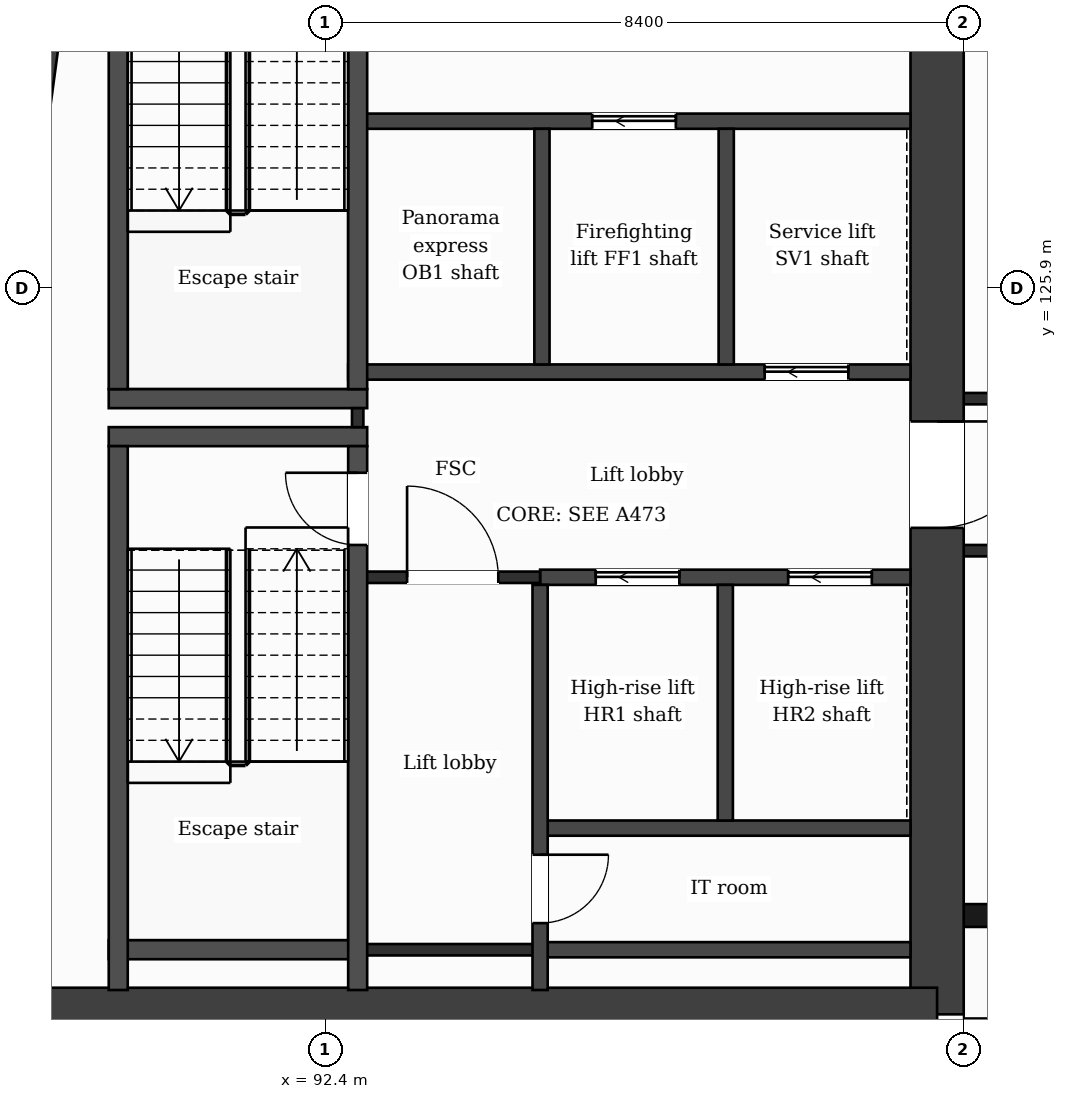
"""IFC4 building model, lengths in metres.
Left out: names, types, materials, properties, quantities, classifications, styles, units other than length and angle.
Written with IfcOpenShell. Run it as: python <this file> out.ifc"""

import sys

from ifc_helpers import new_model, si_unit, direction, frame, frame_2d, origin, place, context, subcontext, project, spatial, rectangle, extrude, element, fill, save


model = new_model("IFC4")
c1 = context("Model", 3, precision=1e-05, world=origin(), true_north=direction((0.0, 1.0)))
c2 = subcontext(c1, "Body", "Model", "MODEL_VIEW")
j1 = project(units=[si_unit("LENGTHUNIT", "METRE"), si_unit("PLANEANGLEUNIT", "RADIAN")], contexts=[c1])
p1 = place(None, origin())
s1 = spatial("IfcSite", under=j1, at=p1, CompositionType="ELEMENT")
p2 = place(p1, origin())
s2 = spatial("IfcBuilding", under=s1, at=p2, CompositionType="ELEMENT")
p3 = place(p2, frame((0.0, 0.0, 296.0)))
s3 = spatial("IfcBuildingStorey", under=s2, at=p3, CompositionType="ELEMENT", Elevation=296.0)
p4 = place(p3, frame((100.45, 132.05, 0.0), z_axis=(0.0, 0.0, 1.0), x_axis=(0.0, -1.0, 0.0)))
e1 = element("IfcWall", 1, at=p4, inside=s3, PredefinedType="SHEAR", context=c2, shape_type="SweptSolid", body=[
    extrude(rectangle(XDim=15.7, YDim=0.7, at=frame_2d((7.85, 0.0))), origin(), (0.0, 0.0, 1.0), 3.7),
])
p5 = place(p4, frame((7.9, 0.0, 0.0)))
e2 = element("IfcOpeningElement", 2, at=p5, cuts=e1, PredefinedType="OPENING", context=c2, shape_type="SweptSolid", body=[
    extrude(rectangle(XDim=1.4, YDim=2.1, at=frame_2d((0.7, 1.05))), frame((0.0, 0.36, 0.0), z_axis=(0.0, -1.0, 0.0), x_axis=(1.0, 0.0, 0.0)), (0.0, 0.0, 1.0), 0.72),
])
p6 = place(p3, frame((100.45, 116.35, 0.0), z_axis=(0.0, 0.0, 1.0), x_axis=(-1.0, 0.0, 0.0)))
e3 = element("IfcWall", 3, at=p6, inside=s3, PredefinedType="SHEAR", context=c2, shape_type="SweptSolid", body=[
    extrude(rectangle(XDim=13.627, YDim=0.7, at=frame_2d((6.813, 0.0))), origin(), (0.0, 0.0, 1.0), 3.7),
])
p7 = place(p3, frame((86.823, 116.35, 0.0), z_axis=(0.0, 0.0, 1.0), x_axis=(0.133416378607, 0.99106007382, 0.0)))
e4 = element("IfcWall", 4, at=p7, inside=s3, PredefinedType="SHEAR", context=c2, shape_type="SweptSolid", body=[
    extrude(rectangle(XDim=15.842, YDim=0.7, at=frame_2d((7.921, 0.0))), origin(), (0.0, 0.0, 1.0), 3.7),
])
p8 = place(p3, frame((100.8, 117.65, 0.0), z_axis=(0.0, 0.0, 1.0), x_axis=(1.0, 0.0, 0.0)))
e5 = element("IfcWall", 5, at=p8, inside=s3, PredefinedType="SOLIDWALL", context=c2, shape_type="SweptSolid", body=[
    extrude(rectangle(XDim=25.2, YDim=0.3, at=frame_2d((12.6, 0.0))), origin(), (0.0, 0.0, 1.0), 3.38),
])
p9 = place(p8, frame((1.55, 0.0, 0.9)))
e6 = element("IfcOpeningElement", 6, at=p9, cuts=e5, PredefinedType="OPENING", context=c2, shape_type="SweptSolid", body=[
    extrude(rectangle(XDim=1.2, YDim=2.1, at=frame_2d((0.6, 1.05))), frame((0.0, 0.16, 0.0), z_axis=(0.0, -1.0, 0.0), x_axis=(1.0, 0.0, 0.0)), (0.0, 0.0, 1.0), 0.32),
])
p10 = place(p8, frame((5.7, 0.0, 0.9)))
e7 = element("IfcOpeningElement", 7, at=p10, cuts=e5, PredefinedType="OPENING", context=c2, shape_type="SweptSolid", body=[
    extrude(rectangle(XDim=1.2, YDim=2.1, at=frame_2d((0.6, 1.05))), frame((0.0, 0.16, 0.0), z_axis=(0.0, -1.0, 0.0), x_axis=(1.0, 0.0, 0.0)), (0.0, 0.0, 1.0), 0.32),
])
p11 = place(p8, frame((9.0, 0.0, 0.0)))
e8 = element("IfcOpeningElement", 8, at=p11, cuts=e5, PredefinedType="OPENING", context=c2, shape_type="SweptSolid", body=[
    extrude(rectangle(XDim=1.2, YDim=2.4, at=frame_2d((0.6, 1.2))), frame((0.0, 0.16, 0.0), z_axis=(0.0, -1.0, 0.0), x_axis=(1.0, 0.0, 0.0)), (0.0, 0.0, 1.0), 0.32),
])
p12 = place(p8, frame((10.8, 0.0, 0.9)))
e9 = element("IfcOpeningElement", 9, at=p12, cuts=e5, PredefinedType="OPENING", context=c2, shape_type="SweptSolid", body=[
    extrude(rectangle(XDim=1.2, YDim=2.1, at=frame_2d((0.6, 1.05))), frame((0.0, 0.16, 0.0), z_axis=(0.0, -1.0, 0.0), x_axis=(1.0, 0.0, 0.0)), (0.0, 0.0, 1.0), 0.32),
])
p13 = place(p8, frame((13.5, 0.0, 0.9)))
e10 = element("IfcOpeningElement", 10, at=p13, cuts=e5, PredefinedType="OPENING", context=c2, shape_type="SweptSolid", body=[
    extrude(rectangle(XDim=2.4, YDim=2.1, at=frame_2d((1.2, 1.05))), frame((0.0, 0.16, 0.0), z_axis=(0.0, -1.0, 0.0), x_axis=(1.0, 0.0, 0.0)), (0.0, 0.0, 1.0), 0.32),
])
p14 = place(p8, frame((17.4, 0.0, 0.0)))
e11 = element("IfcOpeningElement", 11, at=p14, cuts=e5, PredefinedType="OPENING", context=c2, shape_type="SweptSolid", body=[
    extrude(rectangle(XDim=1.2, YDim=2.4, at=frame_2d((0.6, 1.2))), frame((0.0, 0.16, 0.0), z_axis=(0.0, -1.0, 0.0), x_axis=(1.0, 0.0, 0.0)), (0.0, 0.0, 1.0), 0.32),
])
p15 = place(p8, frame((19.2, 0.0, 0.9)))
e12 = element("IfcOpeningElement", 12, at=p15, cuts=e5, PredefinedType="OPENING", context=c2, shape_type="SweptSolid", body=[
    extrude(rectangle(XDim=1.2, YDim=2.1, at=frame_2d((0.6, 1.05))), frame((0.0, 0.16, 0.0), z_axis=(0.0, -1.0, 0.0), x_axis=(1.0, 0.0, 0.0)), (0.0, 0.0, 1.0), 0.32),
])
p16 = place(p8, frame((21.85, 0.0, 0.9)))
e13 = element("IfcOpeningElement", 13, at=p16, cuts=e5, PredefinedType="OPENING", context=c2, shape_type="SweptSolid", body=[
    extrude(rectangle(XDim=2.4, YDim=2.1, at=frame_2d((1.2, 1.05))), frame((0.0, 0.16, 0.0), z_axis=(0.0, -1.0, 0.0), x_axis=(1.0, 0.0, 0.0)), (0.0, 0.0, 1.0), 0.32),
])
p17 = place(p3, frame((95.227, 117.2, 0.0), z_axis=(0.0, 0.0, 1.0), x_axis=(1.0, 0.0, 0.0)))
e14 = element("IfcWall", 14, at=p17, inside=s3, PredefinedType="PARTITIONING", context=c2, shape_type="SweptSolid", body=[
    extrude(rectangle(XDim=4.873, YDim=0.2, at=frame_2d((2.437, 0.0))), origin(), (0.0, 0.0, 1.0), 3.38),
])
p18 = place(p3, frame((92.827, 117.2, 0.0), z_axis=(0.0, 0.0, 1.0), x_axis=(1.0, 0.0, 0.0)))
e15 = element("IfcWall", 15, at=p18, inside=s3, PredefinedType="PARTITIONING", context=c2, shape_type="SweptSolid", body=[
    extrude(rectangle(XDim=2.4, YDim=0.15, at=frame_2d((1.2, 0.0))), origin(), (0.0, 0.0, 1.0), 3.38),
])
p19 = place(p3, frame((89.552, 117.2, 0.0), z_axis=(0.0, 0.0, 1.0), x_axis=(1.0, 0.0, 0.0)))
e16 = element("IfcWall", 16, at=p19, inside=s3, PredefinedType="PARTITIONING", context=c2, shape_type="SweptSolid", body=[
    extrude(rectangle(XDim=3.275, YDim=0.25, at=frame_2d((1.637, 0.0))), origin(), (0.0, 0.0, 1.0), 3.38),
])
p20 = place(p3, frame((95.227, 118.8, 0.0), z_axis=(0.0, 0.0, 1.0), x_axis=(1.0, 0.0, 0.0)))
e17 = element("IfcWall", 17, at=p20, inside=s3, PredefinedType="PARTITIONING", context=c2, shape_type="SweptSolid", body=[
    extrude(rectangle(XDim=4.873, YDim=0.2, at=frame_2d((2.437, 0.0))), origin(), (0.0, 0.0, 1.0), 3.38),
])
p21 = place(p3, frame((95.227, 122.1, 0.0), z_axis=(0.0, 0.0, 1.0), x_axis=(1.0, 0.0, 0.0)))
e18 = element("IfcWall", 18, at=p21, inside=s3, PredefinedType="PARTITIONING", context=c2, shape_type="SweptSolid", body=[
    extrude(rectangle(XDim=4.873, YDim=0.2, at=frame_2d((2.437, 0.0))), origin(), (0.0, 0.0, 1.0), 3.38),
])
p22 = place(p21, frame((0.732, 0.0, 0.0)))
e19 = element("IfcOpeningElement", 19, at=p22, cuts=e18, PredefinedType="OPENING", context=c2, shape_type="SweptSolid", body=[
    extrude(rectangle(XDim=1.1, YDim=2.1, at=frame_2d((0.55, 1.05))), frame((0.0, 0.11, 0.0), z_axis=(0.0, -1.0, 0.0), x_axis=(1.0, 0.0, 0.0)), (0.0, 0.0, 1.0), 0.22),
])
p23 = place(p21, frame((3.264, 0.0, 0.0)))
e20 = element("IfcOpeningElement", 20, at=p23, cuts=e18, PredefinedType="OPENING", context=c2, shape_type="SweptSolid", body=[
    extrude(rectangle(XDim=1.1, YDim=2.1, at=frame_2d((0.55, 1.05))), frame((0.0, 0.11, 0.0), z_axis=(0.0, -1.0, 0.0), x_axis=(1.0, 0.0, 0.0)), (0.0, 0.0, 1.0), 0.22),
])
p24 = place(p3, frame((92.827, 122.1, 0.0), z_axis=(0.0, 0.0, 1.0), x_axis=(1.0, 0.0, 0.0)))
e21 = element("IfcWall", 21, at=p24, inside=s3, PredefinedType="PARTITIONING", context=c2, shape_type="SweptSolid", body=[
    extrude(rectangle(XDim=2.4, YDim=0.15, at=frame_2d((1.2, 0.0))), origin(), (0.0, 0.0, 1.0), 3.38),
])
p25 = place(p24, frame((0.65, 0.0, 0.0)))
e22 = element("IfcOpeningElement", 22, at=p25, cuts=e21, PredefinedType="OPENING", context=c2, shape_type="SweptSolid", body=[
    extrude(rectangle(XDim=1.2, YDim=2.1, at=frame_2d((0.6, 1.05))), frame((0.0, 0.085, 0.0), z_axis=(0.0, -1.0, 0.0), x_axis=(1.0, 0.0, 0.0)), (0.0, 0.0, 1.0), 0.17),
])
p26 = place(p3, frame((100.8, 122.45, 0.0), z_axis=(0.0, 0.0, 1.0), x_axis=(1.0, 0.0, 0.0)))
e23 = element("IfcWall", 23, at=p26, inside=s3, PredefinedType="PARTITIONING", context=c2, shape_type="SweptSolid", body=[
    extrude(rectangle(XDim=25.2, YDim=0.15, at=frame_2d((12.6, 0.0))), origin(), (0.0, 0.0, 1.0), 3.38),
])
p27 = place(p26, frame((1.6, 0.0, 0.0)))
e24 = element("IfcOpeningElement", 24, at=p27, cuts=e23, PredefinedType="OPENING", context=c2, shape_type="SweptSolid", body=[
    extrude(rectangle(XDim=1.0, YDim=2.1, at=frame_2d((0.5, 1.05))), frame((0.0, 0.085, 0.0), z_axis=(0.0, -1.0, 0.0), x_axis=(1.0, 0.0, 0.0)), (0.0, 0.0, 1.0), 0.17),
])
p28 = place(p26, frame((11.12, 0.0, 0.0)))
e25 = element("IfcOpeningElement", 25, at=p28, cuts=e23, PredefinedType="OPENING", context=c2, shape_type="SweptSolid", body=[
    extrude(rectangle(XDim=0.95, YDim=2.1, at=frame_2d((0.475, 1.05))), frame((0.0, 0.085, 0.0), z_axis=(0.0, -1.0, 0.0), x_axis=(1.0, 0.0, 0.0)), (0.0, 0.0, 1.0), 0.17),
])
p29 = place(p26, frame((13.05, 0.0, 0.0)))
e26 = element("IfcOpeningElement", 26, at=p29, cuts=e23, PredefinedType="OPENING", context=c2, shape_type="SweptSolid", body=[
    extrude(rectangle(XDim=1.0, YDim=2.1, at=frame_2d((0.5, 1.05))), frame((0.0, 0.085, 0.0), z_axis=(0.0, -1.0, 0.0), x_axis=(1.0, 0.0, 0.0)), (0.0, 0.0, 1.0), 0.17),
])
p30 = place(p26, frame((19.61, 0.0, 0.0)))
e27 = element("IfcOpeningElement", 27, at=p30, cuts=e23, PredefinedType="OPENING", context=c2, shape_type="SweptSolid", body=[
    extrude(rectangle(XDim=0.95, YDim=2.1, at=frame_2d((0.475, 1.05))), frame((0.0, 0.085, 0.0), z_axis=(0.0, -1.0, 0.0), x_axis=(1.0, 0.0, 0.0)), (0.0, 0.0, 1.0), 0.17),
])
p31 = place(p26, frame((21.275, 0.0, 0.0)))
e28 = element("IfcOpeningElement", 28, at=p31, cuts=e23, PredefinedType="OPENING", context=c2, shape_type="SweptSolid", body=[
    extrude(rectangle(XDim=0.95, YDim=2.1, at=frame_2d((0.475, 1.05))), frame((0.0, 0.085, 0.0), z_axis=(0.0, -1.0, 0.0), x_axis=(1.0, 0.0, 0.0)), (0.0, 0.0, 1.0), 0.17),
])
for number, where, z_axis, x_axis in (
    (29, (89.552, 123.95, 0.0), (0.0, 0.0, 1.0), (1.0, 0.0, 0.0)),
    (30, (89.552, 124.45, 0.0), (0.0, 0.0, 1.0), (1.0, 0.0, 0.0)),
):
    element("IfcWall", number, at=place(p3, frame(where, z_axis=z_axis, x_axis=x_axis)), inside=s3, PredefinedType="PARTITIONING", context=c2, shape_type="SweptSolid", body=[
        extrude(rectangle(XDim=3.4, YDim=0.25, at=frame_2d((1.7, 0.0))), origin(), (0.0, 0.0, 1.0), 3.38),
    ])
p32 = place(p3, frame((100.8, 124.45, 0.0), z_axis=(0.0, 0.0, 1.0), x_axis=(1.0, 0.0, 0.0)))
e31 = element("IfcWall", 31, at=p32, inside=s3, PredefinedType="PARTITIONING", context=c2, shape_type="SweptSolid", body=[
    extrude(rectangle(XDim=25.2, YDim=0.15, at=frame_2d((12.6, 0.0))), origin(), (0.0, 0.0, 1.0), 3.38),
])
p33 = place(p32, frame((1.85, 0.0, 0.0)))
e32 = element("IfcOpeningElement", 32, at=p33, cuts=e31, PredefinedType="OPENING", context=c2, shape_type="SweptSolid", body=[
    extrude(rectangle(XDim=1.0, YDim=2.1, at=frame_2d((0.5, 1.05))), frame((0.0, 0.085, 0.0), z_axis=(0.0, -1.0, 0.0), x_axis=(1.0, 0.0, 0.0)), (0.0, 0.0, 1.0), 0.17),
])
p34 = place(p32, frame((6.425, 0.0, 0.0)))
e33 = element("IfcOpeningElement", 33, at=p34, cuts=e31, PredefinedType="OPENING", context=c2, shape_type="SweptSolid", body=[
    extrude(rectangle(XDim=1.0, YDim=2.1, at=frame_2d((0.5, 1.05))), frame((0.0, 0.085, 0.0), z_axis=(0.0, -1.0, 0.0), x_axis=(1.0, 0.0, 0.0)), (0.0, 0.0, 1.0), 0.17),
])
p35 = place(p32, frame((9.4, 0.0, 0.0)))
e34 = element("IfcOpeningElement", 34, at=p35, cuts=e31, PredefinedType="OPENING", context=c2, shape_type="SweptSolid", body=[
    extrude(rectangle(XDim=1.0, YDim=2.1, at=frame_2d((0.5, 1.05))), frame((0.0, 0.085, 0.0), z_axis=(0.0, -1.0, 0.0), x_axis=(1.0, 0.0, 0.0)), (0.0, 0.0, 1.0), 0.17),
])
p36 = place(p32, frame((14.825, 0.0, 0.0)))
e35 = element("IfcOpeningElement", 35, at=p36, cuts=e31, PredefinedType="OPENING", context=c2, shape_type="SweptSolid", body=[
    extrude(rectangle(XDim=1.0, YDim=2.1, at=frame_2d((0.5, 1.05))), frame((0.0, 0.085, 0.0), z_axis=(0.0, -1.0, 0.0), x_axis=(1.0, 0.0, 0.0)), (0.0, 0.0, 1.0), 0.17),
])
p37 = place(p32, frame((18.825, 0.0, 0.0)))
e36 = element("IfcOpeningElement", 36, at=p37, cuts=e31, PredefinedType="OPENING", context=c2, shape_type="SweptSolid", body=[
    extrude(rectangle(XDim=1.0, YDim=2.1, at=frame_2d((0.5, 1.05))), frame((0.0, 0.085, 0.0), z_axis=(0.0, -1.0, 0.0), x_axis=(1.0, 0.0, 0.0)), (0.0, 0.0, 1.0), 0.17),
])
p38 = place(p3, frame((92.702, 124.8, 0.0), z_axis=(0.0, 0.0, 1.0), x_axis=(1.0, 0.0, 0.0)))
e37 = element("IfcWall", 37, at=p38, inside=s3, PredefinedType="PARTITIONING", context=c2, shape_type="SweptSolid", body=[
    extrude(rectangle(XDim=7.398, YDim=0.2, at=frame_2d((3.699, 0.0))), origin(), (0.0, 0.0, 1.0), 3.38),
])
p39 = place(p38, frame((5.48, 0.0, 0.0)))
e38 = element("IfcOpeningElement", 38, at=p39, cuts=e37, PredefinedType="OPENING", context=c2, shape_type="SweptSolid", body=[
    extrude(rectangle(XDim=1.1, YDim=2.1, at=frame_2d((0.55, 1.05))), frame((0.0, 0.11, 0.0), z_axis=(0.0, -1.0, 0.0), x_axis=(1.0, 0.0, 0.0)), (0.0, 0.0, 1.0), 0.22),
])
p40 = place(p3, frame((92.827, 128.1, 0.0), z_axis=(0.0, 0.0, 1.0), x_axis=(1.0, 0.0, 0.0)))
e39 = element("IfcWall", 39, at=p40, inside=s3, PredefinedType="PARTITIONING", context=c2, shape_type="SweptSolid", body=[
    extrude(rectangle(XDim=7.273, YDim=0.2, at=frame_2d((3.637, 0.0))), origin(), (0.0, 0.0, 1.0), 3.38),
])
p41 = place(p40, frame((3.086, 0.0, 0.0)))
e40 = element("IfcOpeningElement", 40, at=p41, cuts=e39, PredefinedType="OPENING", context=c2, shape_type="SweptSolid", body=[
    extrude(rectangle(XDim=1.1, YDim=2.1, at=frame_2d((0.55, 1.05))), frame((0.0, 0.11, 0.0), z_axis=(0.0, -1.0, 0.0), x_axis=(1.0, 0.0, 0.0)), (0.0, 0.0, 1.0), 0.22),
])
for number, where, z_axis, x_axis in (
    (41, (89.677, 116.67, 0.0), (0.0, 0.0, 1.0), (0.0, 1.0, 0.0)),
    (42, (89.677, 124.575, 0.0), (0.0, 0.0, 1.0), (0.0, 1.0, 0.0)),
):
    element("IfcWall", number, at=place(p3, frame(where, z_axis=z_axis, x_axis=x_axis)), inside=s3, PredefinedType="PARTITIONING", context=c2, shape_type="SweptSolid", body=[
        extrude(rectangle(XDim=7.155, YDim=0.25, at=frame_2d((3.578, 0.0))), origin(), (0.0, 0.0, 1.0), 3.38),
    ])
p42 = place(p3, frame((92.827, 124.075, 0.0), z_axis=(0.0, 0.0, 1.0), x_axis=(0.0, 1.0, 0.0)))
e43 = element("IfcWall", 43, at=p42, inside=s3, PredefinedType="PARTITIONING", context=c2, shape_type="SweptSolid", body=[
    extrude(rectangle(XDim=0.25, YDim=0.15, at=frame_2d((0.125, 0.0))), origin(), (0.0, 0.0, 1.0), 3.38),
])
p43 = place(p3, frame((92.827, 116.67, 0.0), z_axis=(0.0, 0.0, 1.0), x_axis=(0.0, 1.0, 0.0)))
e44 = element("IfcWall", 44, at=p43, inside=s3, PredefinedType="PARTITIONING", context=c2, shape_type="SweptSolid", body=[
    extrude(rectangle(XDim=7.155, YDim=0.25, at=frame_2d((3.578, 0.0))), origin(), (0.0, 0.0, 1.0), 3.38),
])
p44 = place(p43, frame((5.855, 0.0, 0.0)))
e45 = element("IfcOpeningElement", 45, at=p44, cuts=e44, PredefinedType="OPENING", context=c2, shape_type="SweptSolid", body=[
    extrude(rectangle(XDim=0.95, YDim=2.1, at=frame_2d((0.475, 1.05))), frame((0.0, 0.135, 0.0), z_axis=(0.0, -1.0, 0.0), x_axis=(1.0, 0.0, 0.0)), (0.0, 0.0, 1.0), 0.27),
])
p45 = place(p3, frame((92.827, 124.575, 0.0), z_axis=(0.0, 0.0, 1.0), x_axis=(0.0, 1.0, 0.0)))
e46 = element("IfcWall", 46, at=p45, inside=s3, PredefinedType="PARTITIONING", context=c2, shape_type="SweptSolid", body=[
    extrude(rectangle(XDim=7.155, YDim=0.25, at=frame_2d((3.578, 0.0))), origin(), (0.0, 0.0, 1.0), 3.38),
])
p46 = place(p45, frame((5.325, 0.0, 0.0)))
e47 = element("IfcOpeningElement", 47, at=p46, cuts=e46, PredefinedType="OPENING", context=c2, shape_type="SweptSolid", body=[
    extrude(rectangle(XDim=1.0, YDim=2.1, at=frame_2d((0.5, 1.05))), frame((0.0, 0.135, 0.0), z_axis=(0.0, -1.0, 0.0), x_axis=(1.0, 0.0, 0.0)), (0.0, 0.0, 1.0), 0.27),
])
p47 = place(p3, frame((95.227, 116.67, 0.0), z_axis=(0.0, 0.0, 1.0), x_axis=(0.0, 1.0, 0.0)))
e48 = element("IfcWall", 48, at=p47, inside=s3, PredefinedType="PARTITIONING", context=c2, shape_type="SweptSolid", body=[
    extrude(rectangle(XDim=5.33, YDim=0.2, at=frame_2d((2.665, 0.0))), origin(), (0.0, 0.0, 1.0), 3.38),
])
p48 = place(p47, frame((0.88, 0.0, 0.0)))
e49 = element("IfcOpeningElement", 49, at=p48, cuts=e48, PredefinedType="OPENING", context=c2, shape_type="SweptSolid", body=[
    extrude(rectangle(XDim=0.9, YDim=2.1, at=frame_2d((0.45, 1.05))), frame((0.0, 0.11, 0.0), z_axis=(0.0, -1.0, 0.0), x_axis=(1.0, 0.0, 0.0)), (0.0, 0.0, 1.0), 0.22),
])
for number, where, z_axis, x_axis in (
    (50, (95.251, 124.9, 0.0), (0.0, 0.0, 1.0), (0.0, 1.0, 0.0)),
    (51, (97.664, 118.9, 0.0), (0.0, 0.0, 1.0), (0.0, 1.0, 0.0)),
    (52, (97.676, 124.9, 0.0), (0.0, 0.0, 1.0), (0.0, 1.0, 0.0)),
):
    element("IfcWall", number, at=place(p3, frame(where, z_axis=z_axis, x_axis=x_axis)), inside=s3, PredefinedType="PARTITIONING", context=c2, shape_type="SweptSolid", body=[
        extrude(rectangle(XDim=3.1, YDim=0.2, at=frame_2d((1.55, 0.0))), origin(), (0.0, 0.0, 1.0), 3.38),
    ])
p49 = place(p25, origin())
e53 = element("IfcDoor", 53, at=p49, inside=s3, OperationType="SINGLE_SWING_LEFT", PredefinedType="DOOR", context=c2, shape_type="SweptSolid", body=[
    extrude(rectangle(XDim=1.2, YDim=2.1, at=frame_2d((0.6, 1.05))), frame((0.0, 0.025, 0.0), z_axis=(0.0, -1.0, 0.0), x_axis=(1.0, 0.0, 0.0)), (0.0, 0.0, 1.0), 0.05),
])
fill(e22, e53)
p50 = place(p22, origin())
e54 = element("IfcDoor", 54, at=p50, inside=s3, OperationType="SLIDING_TO_LEFT", PredefinedType="DOOR", context=c2, shape_type="SweptSolid", body=[
    extrude(rectangle(XDim=1.1, YDim=2.1, at=frame_2d((0.55, 1.05))), frame((0.0, 0.025, 0.0), z_axis=(0.0, -1.0, 0.0), x_axis=(1.0, 0.0, 0.0)), (0.0, 0.0, 1.0), 0.05),
])
fill(e19, e54)
p51 = place(p23, origin())
e55 = element("IfcDoor", 55, at=p51, inside=s3, OperationType="SLIDING_TO_LEFT", PredefinedType="DOOR", context=c2, shape_type="SweptSolid", body=[
    extrude(rectangle(XDim=1.1, YDim=2.1, at=frame_2d((0.55, 1.05))), frame((0.0, 0.025, 0.0), z_axis=(0.0, -1.0, 0.0), x_axis=(1.0, 0.0, 0.0)), (0.0, 0.0, 1.0), 0.05),
])
fill(e20, e55)
p52 = place(p41, origin())
e56 = element("IfcDoor", 56, at=p52, inside=s3, OperationType="SLIDING_TO_LEFT", PredefinedType="DOOR", context=c2, shape_type="SweptSolid", body=[
    extrude(rectangle(XDim=1.1, YDim=2.1, at=frame_2d((0.55, 1.05))), frame((0.0, 0.025, 0.0), z_axis=(0.0, -1.0, 0.0), x_axis=(1.0, 0.0, 0.0)), (0.0, 0.0, 1.0), 0.05),
])
fill(e40, e56)
p53 = place(p39, origin())
e57 = element("IfcDoor", 57, at=p53, inside=s3, OperationType="SLIDING_TO_LEFT", PredefinedType="DOOR", context=c2, shape_type="SweptSolid", body=[
    extrude(rectangle(XDim=1.1, YDim=2.1, at=frame_2d((0.55, 1.05))), frame((0.0, 0.025, 0.0), z_axis=(0.0, -1.0, 0.0), x_axis=(1.0, 0.0, 0.0)), (0.0, 0.0, 1.0), 0.05),
])
fill(e38, e57)
p54 = place(p44, origin())
e58 = element("IfcDoor", 58, at=p54, inside=s3, OperationType="SINGLE_SWING_RIGHT", PredefinedType="DOOR", context=c2, shape_type="SweptSolid", body=[
    extrude(rectangle(XDim=0.95, YDim=2.1, at=frame_2d((0.475, 1.05))), frame((0.0, 0.025, 0.0), z_axis=(0.0, -1.0, 0.0), x_axis=(1.0, 0.0, 0.0)), (0.0, 0.0, 1.0), 0.05),
])
fill(e45, e58)
p55 = place(p48, origin())
e59 = element("IfcDoor", 59, at=p55, inside=s3, OperationType="SINGLE_SWING_RIGHT", PredefinedType="DOOR", context=c2, shape_type="SweptSolid", body=[
    extrude(rectangle(XDim=0.9, YDim=2.1, at=frame_2d((0.45, 1.05))), frame((0.0, 0.025, 0.0), z_axis=(0.0, -1.0, 0.0), x_axis=(1.0, 0.0, 0.0)), (0.0, 0.0, 1.0), 0.05),
])
fill(e49, e59)
p56 = place(p5, origin())
e60 = element("IfcDoor", 60, at=p56, inside=s3, OperationType="SINGLE_SWING_LEFT", PredefinedType="DOOR", context=c2, shape_type="SweptSolid", body=[
    extrude(rectangle(XDim=1.4, YDim=2.1, at=frame_2d((0.7, 1.05))), frame((0.0, 0.025, 0.0), z_axis=(0.0, -1.0, 0.0), x_axis=(1.0, 0.0, 0.0)), (0.0, 0.0, 1.0), 0.05),
])
fill(e2, e60)
save(model, sys.argv[1])
